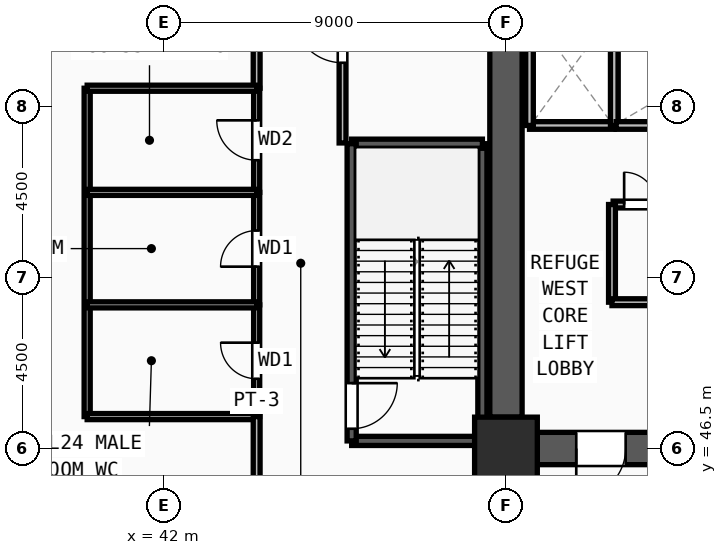
"""IFC4 building model, lengths in metres.
Left out: names, types, materials, properties, quantities, classifications, styles, units other than length and angle.
Written with IfcOpenShell. Run it as: python <this file> out.ifc"""

import sys

from ifc_helpers import new_model, si_unit, direction, frame, frame_2d, origin, origin_2d, place, context, subcontext, project, spatial, rectangle, extrude, source, transform, mapped, element, fill, save


model = new_model("IFC4")
c1 = context("Model", 3, precision=1e-05, world=origin(), true_north=direction((0.0, 1.0)))
c2 = subcontext(c1, "Body", "Model", "MODEL_VIEW")
j1 = project(units=[si_unit("LENGTHUNIT", "METRE"), si_unit("PLANEANGLEUNIT", "RADIAN")], contexts=[c1])
p1 = place(None, origin())
s1 = spatial("IfcSite", under=j1, at=p1, CompositionType="ELEMENT")
p2 = place(p1, origin())
s2 = spatial("IfcBuilding", under=s1, at=p2, CompositionType="ELEMENT")
p3 = place(p2, frame((0.0, 0.0, 93.0)))
s3 = spatial("IfcBuildingStorey", under=s2, at=p3, CompositionType="ELEMENT", Elevation=93.0)
m1 = source(origin(), c2, "Body", "SweptSolid", [
    extrude(rectangle(XDim=1.65, YDim=1.65, at=origin_2d()), origin(), (0.0, 0.0, 1.0), 4.5),
])
p4 = place(p3, frame((51.0, 46.5, 0.0), z_axis=(0.0, 0.0, 1.0), x_axis=(1.0, 0.0, 0.0)))
e1 = element("IfcColumn", 1, at=p4, inside=s3, PredefinedType="COLUMN", context=c2, shape_type="MappedRepresentation", body=[
    mapped(m1, transform((0.0, 0.0, 0.0), x_axis=(1.0, 0.0, 0.0), y_axis=(0.0, 1.0, 0.0), z_axis=(0.0, 0.0, 1.0), scale=1.0)),
])
p5 = place(p3, frame((59.175, 46.5, 0.0), z_axis=(0.0, 0.0, 1.0), x_axis=(-1.0, 0.0, 0.0)))
e2 = element("IfcWall", 2, at=p5, inside=s3, PredefinedType="SHEAR", context=c2, shape_type="SweptSolid", body=[
    extrude(rectangle(XDim=7.35, YDim=0.85, at=frame_2d((3.675, 0.0))), origin(), (0.0, 0.0, 1.0), 4.22),
])
m2 = source(origin(), c2, "Body", "SweptSolid", [
    extrude(rectangle(XDim=1.3, YDim=2.2, at=frame_2d((0.65, 1.1))), frame((0.0, 0.435, 0.0), z_axis=(0.0, -1.0, 0.0), x_axis=(1.0, 0.0, 0.0)), (0.0, 0.0, 1.0), 0.87),
])
p6 = place(p5, frame((5.025, 0.0, 0.0)))
e3 = element("IfcOpeningElement", 3, at=p6, cuts=e2, PredefinedType="OPENING", context=c2, shape_type="MappedRepresentation", body=[
    mapped(m2, transform((0.0, 0.0, 0.0), x_axis=(1.0, 0.0, 0.0), y_axis=(0.0, 1.0, 0.0), z_axis=(0.0, 0.0, 1.0), scale=1.0)),
])
m3 = source(origin(), c2, "Body", "SweptSolid", [
    extrude(rectangle(XDim=1.0, YDim=2.2, at=frame_2d((0.5, 1.1))), frame((0.0, 0.435, 0.0), z_axis=(0.0, -1.0, 0.0), x_axis=(1.0, 0.0, 0.0)), (0.0, 0.0, 1.0), 0.87),
])
p7 = place(p5, frame((0.525, 0.0, 0.0)))
e4 = element("IfcOpeningElement", 4, at=p7, cuts=e2, PredefinedType="OPENING", context=c2, shape_type="MappedRepresentation", body=[
    mapped(m3, transform((0.0, 0.0, 0.0), x_axis=(1.0, 0.0, 0.0), y_axis=(0.0, 1.0, 0.0), z_axis=(0.0, 0.0, 1.0), scale=1.0)),
])
p8 = place(p3, frame((51.0, 47.325, 0.0), z_axis=(0.0, 0.0, 1.0), x_axis=(0.0, 1.0, 0.0)))
e5 = element("IfcWall", 5, at=p8, inside=s3, PredefinedType="SHEAR", context=c2, shape_type="SweptSolid", body=[
    extrude(rectangle(XDim=13.35, YDim=0.85, at=frame_2d((6.675, 0.0))), origin(), (0.0, 0.0, 1.0), 4.22),
])
p9 = place(p3, frame((46.94, 46.7, 0.0), z_axis=(0.0, 0.0, 1.0), x_axis=(1.0, 0.0, 0.0)))
e6 = element("IfcWall", 6, at=p9, inside=s3, PredefinedType="SOLIDWALL", context=c2, shape_type="SweptSolid", body=[
    extrude(rectangle(XDim=3.44, YDim=0.24, at=frame_2d((1.72, 0.0))), origin(), (0.0, 0.0, 1.0), 4.22),
])
p10 = place(p3, frame((50.38, 46.7, 0.0), z_axis=(0.0, 0.0, 1.0), x_axis=(0.0, 1.0, 0.0)))
e7 = element("IfcWall", 7, at=p10, inside=s3, PredefinedType="SOLIDWALL", context=c2, shape_type="SweptSolid", body=[
    extrude(rectangle(XDim=7.82, YDim=0.24, at=frame_2d((3.91, 0.0))), origin(), (0.0, 0.0, 1.0), 4.22),
])
p11 = place(p3, frame((50.38, 54.52, 0.0), z_axis=(0.0, 0.0, 1.0), x_axis=(-1.0, 0.0, 0.0)))
e8 = element("IfcWall", 8, at=p11, inside=s3, PredefinedType="SOLIDWALL", context=c2, shape_type="SweptSolid", body=[
    extrude(rectangle(XDim=3.44, YDim=0.24, at=frame_2d((1.72, 0.0))), origin(), (0.0, 0.0, 1.0), 4.22),
])
p12 = place(p3, frame((46.94, 54.52, 0.0), z_axis=(0.0, 0.0, 1.0), x_axis=(0.0, -1.0, 0.0)))
e9 = element("IfcWall", 9, at=p12, inside=s3, PredefinedType="SOLIDWALL", context=c2, shape_type="SweptSolid", body=[
    extrude(rectangle(XDim=7.82, YDim=0.24, at=frame_2d((3.91, 0.0))), origin(), (0.0, 0.0, 1.0), 4.22),
])
m4 = source(origin(), c2, "Body", "SweptSolid", [
    extrude(rectangle(XDim=1.2, YDim=2.2, at=frame_2d((0.6, 1.1))), frame((0.0, 0.13, 0.0), z_axis=(0.0, -1.0, 0.0), x_axis=(1.0, 0.0, 0.0)), (0.0, 0.0, 1.0), 0.26),
])
p13 = place(p12, frame((6.3, 0.0, 0.0)))
e10 = element("IfcOpeningElement", 10, at=p13, cuts=e9, PredefinedType="OPENING", context=c2, shape_type="MappedRepresentation", body=[
    mapped(m4, transform((0.0, 0.0, 0.0), x_axis=(1.0, 0.0, 0.0), y_axis=(0.0, 1.0, 0.0), z_axis=(0.0, 0.0, 1.0), scale=1.0)),
])
p14 = place(p3, frame((51.62, 55.0, 0.0), z_axis=(0.0, 0.0, 1.0), x_axis=(1.0, 0.0, 0.0)))
e11 = element("IfcWall", 11, at=p14, inside=s3, PredefinedType="SOLIDWALL", context=c2, shape_type="SweptSolid", body=[
    extrude(rectangle(XDim=2.23, YDim=0.2, at=frame_2d((1.115, 0.0))), origin(), (0.0, 0.0, 1.0), 4.22),
])
for number, where, z_axis, x_axis in (
    (12, (53.85, 55.0, 0.0), (0.0, 0.0, 1.0), (0.0, 1.0, 0.0)),
    (13, (51.62, 58.0, 0.0), (0.0, 0.0, 1.0), (0.0, -1.0, 0.0)),
):
    element("IfcWall", number, at=place(p3, frame(where, z_axis=z_axis, x_axis=x_axis)), inside=s3, PredefinedType="SOLIDWALL", context=c2, shape_type="SweptSolid", body=[
        extrude(rectangle(XDim=3.0, YDim=0.2, at=frame_2d((1.5, 0.0))), origin(), (0.0, 0.0, 1.0), 4.22),
    ])
p15 = place(p3, frame((53.9, 55.0, 0.0), z_axis=(0.0, 0.0, 1.0), x_axis=(1.0, 0.0, 0.0)))
e14 = element("IfcWall", 14, at=p15, inside=s3, PredefinedType="SOLIDWALL", context=c2, shape_type="SweptSolid", body=[
    extrude(rectangle(XDim=2.3, YDim=0.2, at=frame_2d((1.15, 0.0))), origin(), (0.0, 0.0, 1.0), 4.22),
])
p16 = place(p3, frame((53.82, 52.92, 0.0), z_axis=(0.0, 0.0, 1.0), x_axis=(1.0, 0.0, 0.0)))
e15 = element("IfcWall", 15, at=p16, inside=s3, PredefinedType="PARTITIONING", context=c2, shape_type="SweptSolid", body=[
    extrude(rectangle(XDim=1.43, YDim=0.18, at=frame_2d((0.715, 0.0))), origin(), (0.0, 0.0, 1.0), 4.22),
])
m5 = source(origin(), c2, "Body", "SweptSolid", [
    extrude(rectangle(XDim=0.85, YDim=2.1, at=frame_2d((0.425, 1.05))), frame((0.0, 0.1, 0.0), z_axis=(0.0, -1.0, 0.0), x_axis=(1.0, 0.0, 0.0)), (0.0, 0.0, 1.0), 0.2),
])
p17 = place(p16, frame((0.29, 0.0, 0.0)))
e16 = element("IfcOpeningElement", 16, at=p17, cuts=e15, PredefinedType="OPENING", context=c2, shape_type="MappedRepresentation", body=[
    mapped(m5, transform((0.0, 0.0, 0.0), x_axis=(1.0, 0.0, 0.0), y_axis=(0.0, 1.0, 0.0), z_axis=(0.0, 0.0, 1.0), scale=1.0)),
])
p18 = place(p3, frame((44.44, 47.34, 0.0), z_axis=(0.0, 0.0, 1.0), x_axis=(0.0, 1.0, 0.0)))
e17 = element("IfcWall", 17, at=p18, inside=s3, PredefinedType="PARTITIONING", context=c2, shape_type="SweptSolid", body=[
    extrude(rectangle(XDim=2.94, YDim=0.16, at=frame_2d((1.47, 0.0))), origin(), (0.0, 0.0, 1.0), 4.22),
])
m6 = source(origin(), c2, "Body", "SweptSolid", [
    extrude(rectangle(XDim=0.95, YDim=2.15, at=frame_2d((0.475, 1.075))), frame((0.0, 0.09, 0.0), z_axis=(0.0, -1.0, 0.0), x_axis=(1.0, 0.0, 0.0)), (0.0, 0.0, 1.0), 0.18),
])
p19 = place(p18, frame((0.995, 0.0, 0.0)))
e18 = element("IfcOpeningElement", 18, at=p19, cuts=e17, PredefinedType="OPENING", context=c2, shape_type="MappedRepresentation", body=[
    mapped(m6, transform((0.0, 0.0, 0.0), x_axis=(1.0, 0.0, 0.0), y_axis=(0.0, 1.0, 0.0), z_axis=(0.0, 0.0, 1.0), scale=1.0)),
])
p20 = place(p3, frame((44.44, 50.28, 0.0), z_axis=(0.0, 0.0, 1.0), x_axis=(0.0, 1.0, 0.0)))
e19 = element("IfcWall", 19, at=p20, inside=s3, PredefinedType="PARTITIONING", context=c2, shape_type="SweptSolid", body=[
    extrude(rectangle(XDim=2.96, YDim=0.16, at=frame_2d((1.48, 0.0))), origin(), (0.0, 0.0, 1.0), 4.22),
])
p21 = place(p20, frame((1.005, 0.0, 0.0)))
e20 = element("IfcOpeningElement", 20, at=p21, cuts=e19, PredefinedType="OPENING", context=c2, shape_type="MappedRepresentation", body=[
    mapped(m6, transform((0.0, 0.0, 0.0), x_axis=(1.0, 0.0, 0.0), y_axis=(0.0, 1.0, 0.0), z_axis=(0.0, 0.0, 1.0), scale=1.0)),
])
p22 = place(p3, frame((44.44, 53.24, 0.0), z_axis=(0.0, 0.0, 1.0), x_axis=(0.0, 1.0, 0.0)))
e21 = element("IfcWall", 21, at=p22, inside=s3, PredefinedType="PARTITIONING", context=c2, shape_type="SweptSolid", body=[
    extrude(rectangle(XDim=2.74, YDim=0.16, at=frame_2d((1.37, 0.0))), origin(), (0.0, 0.0, 1.0), 4.22),
])
m7 = source(origin(), c2, "Body", "SweptSolid", [
    extrude(rectangle(XDim=1.05, YDim=2.15, at=frame_2d((0.525, 1.075))), frame((0.0, 0.09, 0.0), z_axis=(0.0, -1.0, 0.0), x_axis=(1.0, 0.0, 0.0)), (0.0, 0.0, 1.0), 0.18),
])
p23 = place(p22, frame((0.845, 0.0, 0.0)))
e22 = element("IfcOpeningElement", 22, at=p23, cuts=e21, PredefinedType="OPENING", context=c2, shape_type="MappedRepresentation", body=[
    mapped(m7, transform((0.0, 0.0, 0.0), x_axis=(1.0, 0.0, 0.0), y_axis=(0.0, 1.0, 0.0), z_axis=(0.0, 0.0, 1.0), scale=1.0)),
])
p24 = place(p3, frame((46.7, 54.54, 0.0), z_axis=(0.0, 0.0, 1.0), x_axis=(0.0, 1.0, 0.0)))
e23 = element("IfcWall", 23, at=p24, inside=s3, PredefinedType="PARTITIONING", context=c2, shape_type="SweptSolid", body=[
    extrude(rectangle(XDim=5.52, YDim=0.18, at=frame_2d((2.76, 0.0))), origin(), (0.0, 0.0, 1.0), 4.22),
])
m8 = source(origin(), c2, "Body", "SweptSolid", [
    extrude(rectangle(XDim=1.3, YDim=2.2, at=frame_2d((0.65, 1.1))), frame((0.0, 0.1, 0.0), z_axis=(0.0, -1.0, 0.0), x_axis=(1.0, 0.0, 0.0)), (0.0, 0.0, 1.0), 0.2),
])
p25 = place(p24, frame((2.11, 0.0, 0.0)))
e24 = element("IfcOpeningElement", 24, at=p25, cuts=e23, PredefinedType="OPENING", context=c2, shape_type="MappedRepresentation", body=[
    mapped(m8, transform((0.0, 0.0, 0.0), x_axis=(1.0, 0.0, 0.0), y_axis=(0.0, 1.0, 0.0), z_axis=(0.0, 0.0, 1.0), scale=1.0)),
])
p26 = place(p3, frame((44.44, 55.98, 0.0), z_axis=(0.0, 0.0, 1.0), x_axis=(0.0, 1.0, 0.0)))
e25 = element("IfcWall", 25, at=p26, inside=s3, PredefinedType="PARTITIONING", context=c2, shape_type="SweptSolid", body=[
    extrude(rectangle(XDim=11.035, YDim=0.18, at=frame_2d((5.518, 0.0))), origin(), (0.0, 0.0, 1.0), 4.22),
])
m9 = source(origin(), c2, "Body", "SweptSolid", [
    extrude(rectangle(XDim=1.4, YDim=2.25, at=frame_2d((0.7, 1.125))), frame((0.0, 0.1, 0.0), z_axis=(0.0, -1.0, 0.0), x_axis=(1.0, 0.0, 0.0)), (0.0, 0.0, 1.0), 0.2),
])
p27 = place(p26, frame((4.518, 0.0, 0.0)))
e26 = element("IfcOpeningElement", 26, at=p27, cuts=e25, PredefinedType="OPENING", context=c2, shape_type="MappedRepresentation", body=[
    mapped(m9, transform((0.0, 0.0, 0.0), x_axis=(1.0, 0.0, 0.0), y_axis=(0.0, 1.0, 0.0), z_axis=(0.0, 0.0, 1.0), scale=1.0)),
])
p28 = place(p3, frame((53.79, 50.35, 0.0), z_axis=(0.0, 0.0, 1.0), x_axis=(0.0, 1.0, 0.0)))
e27 = element("IfcWall", 27, at=p28, inside=s3, PredefinedType="PARTITIONING", context=c2, shape_type="SweptSolid", body=[
    extrude(rectangle(XDim=2.57, YDim=0.18, at=frame_2d((1.285, 0.0))), origin(), (0.0, 0.0, 1.0), 4.22),
])
p29 = place(p3, frame((53.79, 50.35, 0.0), z_axis=(0.0, 0.0, 1.0), x_axis=(1.0, 0.0, 0.0)))
e28 = element("IfcWall", 28, at=p29, inside=s3, PredefinedType="PARTITIONING", context=c2, shape_type="SweptSolid", body=[
    extrude(rectangle(XDim=1.49, YDim=0.18, at=frame_2d((0.745, 0.0))), origin(), (0.0, 0.0, 1.0), 4.22),
])
p30 = place(p3, frame((39.98, 47.34, 0.0), z_axis=(0.0, 0.0, 1.0), x_axis=(0.0, 1.0, 0.0)))
e29 = element("IfcWall", 29, at=p30, inside=s3, PredefinedType="PARTITIONING", context=c2, shape_type="SweptSolid", body=[
    extrude(rectangle(XDim=8.64, YDim=0.16, at=frame_2d((4.32, 0.0))), origin(), (0.0, 0.0, 1.0), 4.22),
])
for number, where, z_axis, x_axis in (
    (30, (39.98, 47.34, 0.0), (0.0, 0.0, 1.0), (1.0, 0.0, 0.0)),
    (31, (39.98, 50.28, 0.0), (0.0, 0.0, 1.0), (1.0, 0.0, 0.0)),
    (32, (39.98, 53.24, 0.0), (0.0, 0.0, 1.0), (1.0, 0.0, 0.0)),
    (33, (39.98, 55.98, 0.0), (0.0, 0.0, 1.0), (1.0, 0.0, 0.0)),
):
    element("IfcWall", number, at=place(p3, frame(where, z_axis=z_axis, x_axis=x_axis)), inside=s3, PredefinedType="PARTITIONING", context=c2, shape_type="SweptSolid", body=[
        extrude(rectangle(XDim=4.46, YDim=0.16, at=frame_2d((2.23, 0.0))), origin(), (0.0, 0.0, 1.0), 4.22),
    ])
p31 = place(p3, frame((44.44, 44.585, 0.0), z_axis=(0.0, 0.0, 1.0), x_axis=(0.0, 1.0, 0.0)))
e34 = element("IfcWall", 34, at=p31, inside=s3, PredefinedType="PARTITIONING", context=c2, shape_type="SweptSolid", body=[
    extrude(rectangle(XDim=2.755, YDim=0.18, at=frame_2d((1.377, 0.0))), origin(), (0.0, 0.0, 1.0), 4.22),
])
m10 = source(origin(), c2, "Body", "SweptSolid", [
    extrude(rectangle(XDim=1.3, YDim=2.2, at=frame_2d((0.65, 1.1))), frame((0.0, 0.025, 0.0), z_axis=(0.0, -1.0, 0.0), x_axis=(1.0, 0.0, 0.0)), (0.0, 0.0, 1.0), 0.05),
])
p32 = place(p6, origin())
e35 = element("IfcDoor", 35, at=p32, inside=s3, OperationType="SINGLE_SWING_RIGHT", PredefinedType="DOOR", context=c2, shape_type="MappedRepresentation", body=[
    mapped(m10, transform((0.0, 0.0, 0.0), x_axis=(1.0, 0.0, 0.0), y_axis=(0.0, 1.0, 0.0), z_axis=(0.0, 0.0, 1.0), scale=1.0)),
])
fill(e3, e35)
m11 = source(origin(), c2, "Body", "SweptSolid", [
    extrude(rectangle(XDim=1.2, YDim=2.2, at=frame_2d((0.6, 1.1))), frame((0.0, 0.025, 0.0), z_axis=(0.0, -1.0, 0.0), x_axis=(1.0, 0.0, 0.0)), (0.0, 0.0, 1.0), 0.05),
])
p33 = place(p13, origin())
e36 = element("IfcDoor", 36, at=p33, inside=s3, OperationType="SINGLE_SWING_LEFT", PredefinedType="DOOR", context=c2, shape_type="MappedRepresentation", body=[
    mapped(m11, transform((0.0, 0.0, 0.0), x_axis=(1.0, 0.0, 0.0), y_axis=(0.0, 1.0, 0.0), z_axis=(0.0, 0.0, 1.0), scale=1.0)),
])
fill(e10, e36)
m12 = source(origin(), c2, "Body", "SweptSolid", [
    extrude(rectangle(XDim=0.85, YDim=2.1, at=frame_2d((0.425, 1.05))), frame((0.0, 0.025, 0.0), z_axis=(0.0, -1.0, 0.0), x_axis=(1.0, 0.0, 0.0)), (0.0, 0.0, 1.0), 0.05),
])
p34 = place(p17, origin())
e37 = element("IfcDoor", 37, at=p34, inside=s3, OperationType="SINGLE_SWING_LEFT", PredefinedType="DOOR", context=c2, shape_type="MappedRepresentation", body=[
    mapped(m12, transform((0.0, 0.0, 0.0), x_axis=(1.0, 0.0, 0.0), y_axis=(0.0, 1.0, 0.0), z_axis=(0.0, 0.0, 1.0), scale=1.0)),
])
fill(e16, e37)
m13 = source(origin(), c2, "Body", "SweptSolid", [
    extrude(rectangle(XDim=0.95, YDim=2.15, at=frame_2d((0.475, 1.075))), frame((0.0, 0.025, 0.0), z_axis=(0.0, -1.0, 0.0), x_axis=(1.0, 0.0, 0.0)), (0.0, 0.0, 1.0), 0.05),
])
p35 = place(p19, origin())
e38 = element("IfcDoor", 38, at=p35, inside=s3, OperationType="SINGLE_SWING_RIGHT", PredefinedType="DOOR", context=c2, shape_type="MappedRepresentation", body=[
    mapped(m13, transform((0.0, 0.0, 0.0), x_axis=(1.0, 0.0, 0.0), y_axis=(0.0, 1.0, 0.0), z_axis=(0.0, 0.0, 1.0), scale=1.0)),
])
fill(e18, e38)
p36 = place(p21, origin())
e39 = element("IfcDoor", 39, at=p36, inside=s3, OperationType="SINGLE_SWING_LEFT", PredefinedType="DOOR", context=c2, shape_type="MappedRepresentation", body=[
    mapped(m13, transform((0.0, 0.0, 0.0), x_axis=(1.0, 0.0, 0.0), y_axis=(0.0, 1.0, 0.0), z_axis=(0.0, 0.0, 1.0), scale=1.0)),
])
fill(e20, e39)
m14 = source(origin(), c2, "Body", "SweptSolid", [
    extrude(rectangle(XDim=1.05, YDim=2.15, at=frame_2d((0.525, 1.075))), frame((0.0, 0.025, 0.0), z_axis=(0.0, -1.0, 0.0), x_axis=(1.0, 0.0, 0.0)), (0.0, 0.0, 1.0), 0.05),
])
p37 = place(p23, origin())
e40 = element("IfcDoor", 40, at=p37, inside=s3, OperationType="SINGLE_SWING_RIGHT", PredefinedType="DOOR", context=c2, shape_type="MappedRepresentation", body=[
    mapped(m14, transform((0.0, 0.0, 0.0), x_axis=(1.0, 0.0, 0.0), y_axis=(0.0, 1.0, 0.0), z_axis=(0.0, 0.0, 1.0), scale=1.0)),
])
fill(e22, e40)
p38 = place(p25, origin())
e41 = element("IfcDoor", 41, at=p38, inside=s3, OperationType="SINGLE_SWING_RIGHT", PredefinedType="DOOR", context=c2, shape_type="MappedRepresentation", body=[
    mapped(m10, transform((0.0, 0.0, 0.0), x_axis=(1.0, 0.0, 0.0), y_axis=(0.0, 1.0, 0.0), z_axis=(0.0, 0.0, 1.0), scale=1.0)),
])
fill(e24, e41)
save(model, sys.argv[1])
